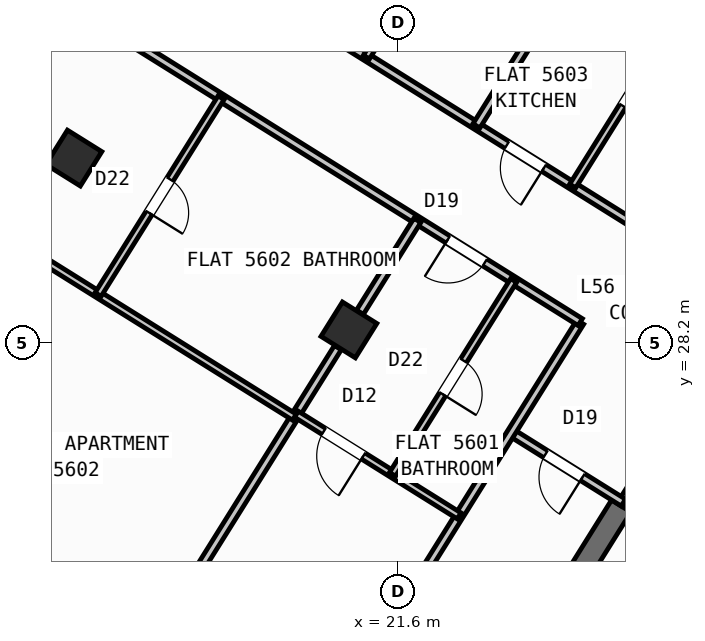
"""IFC4 building model, lengths in metres.
Left out: names, types, materials, properties, quantities, classifications, styles, units other than length and angle.
Written with IfcOpenShell. Run it as: python <this file> out.ifc"""

import sys

from ifc_helpers import new_model, si_unit, direction, frame, frame_2d, origin, origin_2d, place, context, subcontext, project, spatial, rectangle, hollow_rectangle, extrude, source, transform, mapped, element, fill, save


model = new_model("IFC4")
c1 = context("Model", 3, precision=1e-05, world=origin(), true_north=direction((0.0, 1.0)))
c2 = subcontext(c1, "Body", "Model", "MODEL_VIEW")
j1 = project(units=[si_unit("LENGTHUNIT", "METRE"), si_unit("PLANEANGLEUNIT", "RADIAN")], contexts=[c1])
p1 = place(None, origin())
s1 = spatial("IfcSite", under=j1, at=p1, CompositionType="ELEMENT")
p2 = place(p1, origin())
s2 = spatial("IfcBuilding", under=s1, at=p2, CompositionType="ELEMENT")
p3 = place(p2, frame((0.0, 0.0, 222.0)))
s3 = spatial("IfcBuildingStorey", under=s2, at=p3, CompositionType="ELEMENT", Elevation=222.0)
p4 = place(p3, frame((26.007, 24.976, 0.0), z_axis=(0.0, 0.0, 1.0), x_axis=(-0.529931155655, -0.848040665456, 0.0)))
e1 = element("IfcWall", 1, at=p4, inside=s3, PredefinedType="SHEAR", context=c2, shape_type="SweptSolid", body=[
    extrude(rectangle(XDim=6.475, YDim=0.45, at=frame_2d((3.238, 0.0))), origin(), (0.0, 0.0, 1.0), 3.35),
])
m1 = source(origin(), c2, "Body", "SweptSolid", [
    extrude(hollow_rectangle(XDim=0.8, YDim=0.8, WallThickness=0.032, at=origin_2d()), origin(), (0.0, 0.0, 1.0), 3.6),
])
for number, where, z_axis, x_axis in (
    (2, (20.632, 28.452, 0.0), (0.0, 0.0, 1.0), (-0.848, 0.53, 0.0)),
    (3, (15.205, 31.844, 0.0), (0.0, 0.0, 1.0), (-0.848, 0.53, 0.0)),
):
    element("IfcColumn", number, at=place(p3, frame(where, z_axis=z_axis, x_axis=x_axis)), inside=s3, PredefinedType="COLUMN", context=c2, shape_type="MappedRepresentation", body=[
        mapped(m1, transform((0.0, 0.0, 0.0), scale=1.0)),
    ])
p5 = place(p3, frame((31.76, 12.183, 0.0), z_axis=(0.0, 0.0, 1.0), x_axis=(-0.848047074256, 0.529920899612, 0.0)))
e4 = element("IfcWall", 4, at=p5, inside=s3, PredefinedType="STANDARD", context=c2, shape_type="SweptSolid", body=[
    extrude(rectangle(XDim=30.652, YDim=0.32, at=frame_2d((15.326, 0.0))), origin(), (0.0, 0.0, 1.0), 3.35),
])
p6 = place(p5, frame((15.166, 0.0, 0.0)))
e5 = element("IfcOpeningElement", 5, at=p6, cuts=e4, PredefinedType="OPENING", context=c2, shape_type="SweptSolid", body=[
    extrude(rectangle(XDim=1.2, YDim=2.15, at=frame_2d((0.6, 1.075))), frame((0.0, 0.17, 0.0), z_axis=(0.0, -1.0, 0.0), x_axis=(1.0, 0.0, 0.0)), (0.0, 0.0, 1.0), 0.34),
])
p7 = place(p5, frame((2.24, 0.0, 0.9)))
e6 = element("IfcOpeningElement", 6, at=p7, cuts=e4, PredefinedType="OPENING", context=c2, shape_type="SweptSolid", body=[
    extrude(rectangle(XDim=1.65, YDim=1.45, at=frame_2d((0.825, 0.725))), frame((0.0, 0.17, 0.0), z_axis=(0.0, -1.0, 0.0), x_axis=(1.0, 0.0, 0.0)), (0.0, 0.0, 1.0), 0.34),
])
p8 = place(p5, frame((7.469, 0.0, 0.9)))
e7 = element("IfcOpeningElement", 7, at=p8, cuts=e4, PredefinedType="OPENING", context=c2, shape_type="SweptSolid", body=[
    extrude(rectangle(XDim=1.65, YDim=1.45, at=frame_2d((0.825, 0.725))), frame((0.0, 0.17, 0.0), z_axis=(0.0, -1.0, 0.0), x_axis=(1.0, 0.0, 0.0)), (0.0, 0.0, 1.0), 0.34),
])
p9 = place(p5, frame((12.623, 0.0, 1.0)))
e8 = element("IfcOpeningElement", 8, at=p9, cuts=e4, PredefinedType="OPENING", context=c2, shape_type="SweptSolid", body=[
    extrude(rectangle(XDim=0.9, YDim=1.25, at=frame_2d((0.45, 0.625))), frame((0.0, 0.17, 0.0), z_axis=(0.0, -1.0, 0.0), x_axis=(1.0, 0.0, 0.0)), (0.0, 0.0, 1.0), 0.34),
])
p10 = place(p5, frame((19.583, 0.0, 1.0)))
e9 = element("IfcOpeningElement", 9, at=p10, cuts=e4, PredefinedType="OPENING", context=c2, shape_type="SweptSolid", body=[
    extrude(rectangle(XDim=0.9, YDim=1.25, at=frame_2d((0.45, 0.625))), frame((0.0, 0.17, 0.0), z_axis=(0.0, -1.0, 0.0), x_axis=(1.0, 0.0, 0.0)), (0.0, 0.0, 1.0), 0.34),
])
p11 = place(p5, frame((22.033, 0.0, 1.0)))
e10 = element("IfcOpeningElement", 10, at=p11, cuts=e4, PredefinedType="OPENING", context=c2, shape_type="SweptSolid", body=[
    extrude(rectangle(XDim=0.9, YDim=1.25, at=frame_2d((0.45, 0.625))), frame((0.0, 0.17, 0.0), z_axis=(0.0, -1.0, 0.0), x_axis=(1.0, 0.0, 0.0)), (0.0, 0.0, 1.0), 0.34),
])
p12 = place(p5, frame((27.666, 0.0, 0.9)))
e11 = element("IfcOpeningElement", 11, at=p12, cuts=e4, PredefinedType="OPENING", context=c2, shape_type="SweptSolid", body=[
    extrude(rectangle(XDim=1.35, YDim=1.45, at=frame_2d((0.675, 0.725))), frame((0.0, 0.17, 0.0), z_axis=(0.0, -1.0, 0.0), x_axis=(1.0, 0.0, 0.0)), (0.0, 0.0, 1.0), 0.34),
])
p13 = place(p3, frame((5.7, 28.71, 0.0), z_axis=(0.0, 0.0, 1.0), x_axis=(0.529923711467, 0.8480453172, 0.0)))
e12 = element("IfcWall", 12, at=p13, inside=s3, PredefinedType="STANDARD", context=c2, shape_type="SweptSolid", body=[
    extrude(rectangle(XDim=21.587, YDim=0.32, at=frame_2d((10.794, 0.0))), origin(), (0.0, 0.0, 1.0), 2.825),
])
p14 = place(p13, frame((2.319, 0.0, 0.9)))
e13 = element("IfcOpeningElement", 13, at=p14, cuts=e12, PredefinedType="OPENING", context=c2, shape_type="SweptSolid", body=[
    extrude(rectangle(XDim=1.65, YDim=1.45, at=frame_2d((0.825, 0.725))), frame((0.0, 0.17, 0.0), z_axis=(0.0, -1.0, 0.0), x_axis=(1.0, 0.0, 0.0)), (0.0, 0.0, 1.0), 0.34),
])
p15 = place(p13, frame((8.629, 0.0, 1.0)))
e14 = element("IfcOpeningElement", 14, at=p15, cuts=e12, PredefinedType="OPENING", context=c2, shape_type="SweptSolid", body=[
    extrude(rectangle(XDim=0.9, YDim=1.25, at=frame_2d((0.45, 0.625))), frame((0.0, 0.17, 0.0), z_axis=(0.0, -1.0, 0.0), x_axis=(1.0, 0.0, 0.0)), (0.0, 0.0, 1.0), 0.34),
])
p16 = place(p13, frame((13.159, 0.0, 1.0)))
e15 = element("IfcOpeningElement", 15, at=p16, cuts=e12, PredefinedType="OPENING", context=c2, shape_type="SweptSolid", body=[
    extrude(rectangle(XDim=0.9, YDim=1.25, at=frame_2d((0.45, 0.625))), frame((0.0, 0.17, 0.0), z_axis=(0.0, -1.0, 0.0), x_axis=(1.0, 0.0, 0.0)), (0.0, 0.0, 1.0), 0.34),
])
p17 = place(p13, frame((16.232, 0.0, 1.0)))
e16 = element("IfcOpeningElement", 16, at=p17, cuts=e12, PredefinedType="OPENING", context=c2, shape_type="SweptSolid", body=[
    extrude(rectangle(XDim=0.9, YDim=1.25, at=frame_2d((0.45, 0.625))), frame((0.0, 0.17, 0.0), z_axis=(0.0, -1.0, 0.0), x_axis=(1.0, 0.0, 0.0)), (0.0, 0.0, 1.0), 0.34),
])
p18 = place(p13, frame((18.925, 0.0, 0.9)))
e17 = element("IfcOpeningElement", 17, at=p18, cuts=e12, PredefinedType="OPENING", context=c2, shape_type="SweptSolid", body=[
    extrude(rectangle(XDim=1.35, YDim=1.45, at=frame_2d((0.675, 0.725))), frame((0.0, 0.17, 0.0), z_axis=(0.0, -1.0, 0.0), x_axis=(1.0, 0.0, 0.0)), (0.0, 0.0, 1.0), 0.34),
])
p19 = place(p3, frame((17.424, 47.083, 0.0), z_axis=(0.0, 0.0, 1.0), x_axis=(0.848049927979, -0.529916332693, 0.0)))
e18 = element("IfcWall", 18, at=p19, inside=s3, PredefinedType="STANDARD", context=c2, shape_type="SweptSolid", body=[
    extrude(rectangle(XDim=29.223, YDim=0.32, at=frame_2d((14.612, 0.0))), origin(), (0.0, 0.0, 1.0), 3.35),
])
p20 = place(p19, frame((3.77, 0.0, 0.0)))
e19 = element("IfcOpeningElement", 19, at=p20, cuts=e18, PredefinedType="OPENING", context=c2, shape_type="SweptSolid", body=[
    extrude(rectangle(XDim=1.05, YDim=2.15, at=frame_2d((0.525, 1.075))), frame((0.0, 0.17, 0.0), z_axis=(0.0, -1.0, 0.0), x_axis=(1.0, 0.0, 0.0)), (0.0, 0.0, 1.0), 0.34),
])
p21 = place(p19, frame((1.125, 0.0, 0.9)))
e20 = element("IfcOpeningElement", 20, at=p21, cuts=e18, PredefinedType="OPENING", context=c2, shape_type="SweptSolid", body=[
    extrude(rectangle(XDim=1.65, YDim=1.45, at=frame_2d((0.825, 0.725))), frame((0.0, 0.17, 0.0), z_axis=(0.0, -1.0, 0.0), x_axis=(1.0, 0.0, 0.0)), (0.0, 0.0, 1.0), 0.34),
])
p22 = place(p19, frame((7.384, 0.0, 0.9)))
e21 = element("IfcOpeningElement", 21, at=p22, cuts=e18, PredefinedType="OPENING", context=c2, shape_type="SweptSolid", body=[
    extrude(rectangle(XDim=1.35, YDim=1.45, at=frame_2d((0.675, 0.725))), frame((0.0, 0.17, 0.0), z_axis=(0.0, -1.0, 0.0), x_axis=(1.0, 0.0, 0.0)), (0.0, 0.0, 1.0), 0.34),
])
p23 = place(p19, frame((10.054, 0.0, 0.9)))
e22 = element("IfcOpeningElement", 22, at=p23, cuts=e18, PredefinedType="OPENING", context=c2, shape_type="SweptSolid", body=[
    extrude(rectangle(XDim=1.35, YDim=1.45, at=frame_2d((0.675, 0.725))), frame((0.0, 0.17, 0.0), z_axis=(0.0, -1.0, 0.0), x_axis=(1.0, 0.0, 0.0)), (0.0, 0.0, 1.0), 0.34),
])
p24 = place(p19, frame((14.039, 0.0, 1.0)))
e23 = element("IfcOpeningElement", 23, at=p24, cuts=e18, PredefinedType="OPENING", context=c2, shape_type="SweptSolid", body=[
    extrude(rectangle(XDim=0.9, YDim=1.25, at=frame_2d((0.45, 0.625))), frame((0.0, 0.17, 0.0), z_axis=(0.0, -1.0, 0.0), x_axis=(1.0, 0.0, 0.0)), (0.0, 0.0, 1.0), 0.34),
])
p25 = place(p19, frame((17.254, 0.0, 1.0)))
e24 = element("IfcOpeningElement", 24, at=p25, cuts=e18, PredefinedType="OPENING", context=c2, shape_type="SweptSolid", body=[
    extrude(rectangle(XDim=0.9, YDim=1.25, at=frame_2d((0.45, 0.625))), frame((0.0, 0.17, 0.0), z_axis=(0.0, -1.0, 0.0), x_axis=(1.0, 0.0, 0.0)), (0.0, 0.0, 1.0), 0.34),
])
p26 = place(p19, frame((20.161, 0.0, 0.9)))
e25 = element("IfcOpeningElement", 25, at=p26, cuts=e18, PredefinedType="OPENING", context=c2, shape_type="SweptSolid", body=[
    extrude(rectangle(XDim=1.35, YDim=1.45, at=frame_2d((0.675, 0.725))), frame((0.0, 0.17, 0.0), z_axis=(0.0, -1.0, 0.0), x_axis=(1.0, 0.0, 0.0)), (0.0, 0.0, 1.0), 0.34),
])
p27 = place(p19, frame((22.846, 0.0, 0.9)))
e26 = element("IfcOpeningElement", 26, at=p27, cuts=e18, PredefinedType="OPENING", context=c2, shape_type="SweptSolid", body=[
    extrude(rectangle(XDim=1.35, YDim=1.45, at=frame_2d((0.675, 0.725))), frame((0.0, 0.17, 0.0), z_axis=(0.0, -1.0, 0.0), x_axis=(1.0, 0.0, 0.0)), (0.0, 0.0, 1.0), 0.34),
])
p28 = place(p19, frame((26.898, 0.0, 1.0)))
e27 = element("IfcOpeningElement", 27, at=p28, cuts=e18, PredefinedType="OPENING", context=c2, shape_type="SweptSolid", body=[
    extrude(rectangle(XDim=0.9, YDim=1.25, at=frame_2d((0.45, 0.625))), frame((0.0, 0.17, 0.0), z_axis=(0.0, -1.0, 0.0), x_axis=(1.0, 0.0, 0.0)), (0.0, 0.0, 1.0), 0.34),
])
p29 = place(p3, frame((27.596, 27.52, 0.0), z_axis=(0.0, 0.0, 1.0), x_axis=(-0.529865479138, -0.848081702443, 0.0)))
e28 = element("IfcWall", 28, at=p29, inside=s3, PredefinedType="STANDARD", context=c2, shape_type="SweptSolid", body=[
    extrude(rectangle(XDim=2.96, YDim=0.2, at=frame_2d((1.48, 0.0))), origin(), (0.0, 0.0, 1.0), 3.34),
])
p30 = place(p29, frame((0.7, 0.0, 0.0)))
e29 = element("IfcOpeningElement", 29, at=p30, cuts=e28, PredefinedType="OPENING", context=c2, shape_type="SweptSolid", body=[
    extrude(rectangle(XDim=1.5, YDim=2.15, at=frame_2d((0.75, 1.075))), frame((0.0, 0.11, 0.0), z_axis=(0.0, -1.0, 0.0), x_axis=(1.0, 0.0, 0.0)), (0.0, 0.0, 1.0), 0.22),
])
p31 = place(p3, frame((26.049, 25.044, 0.0), z_axis=(0.0, 0.0, 1.0), x_axis=(-0.848050851465, 0.529914854792, 0.0)))
e30 = element("IfcWall", 30, at=p31, inside=s3, PredefinedType="PARTITIONING", context=c2, shape_type="SweptSolid", body=[
    extrude(rectangle(XDim=2.61, YDim=0.16, at=frame_2d((1.305, 0.0))), origin(), (0.0, 0.0, 1.0), 2.825),
])
p32 = place(p31, frame((0.95, 0.0, 0.0)))
e31 = element("IfcOpeningElement", 31, at=p32, cuts=e30, PredefinedType="OPENING", context=c2, shape_type="SweptSolid", body=[
    extrude(rectangle(XDim=0.86, YDim=2.05, at=frame_2d((0.43, 1.025))), frame((0.0, 0.09, 0.0), z_axis=(0.0, -1.0, 0.0), x_axis=(1.0, 0.0, 0.0)), (0.0, 0.0, 1.0), 0.18),
])
p33 = place(p3, frame((25.198, 28.606, 0.0), z_axis=(0.0, 0.0, 1.0), x_axis=(-0.529926497642, -0.848043576178, 0.0)))
e32 = element("IfcWall", 32, at=p33, inside=s3, PredefinedType="PARTITIONING", context=c2, shape_type="SweptSolid", body=[
    extrude(rectangle(XDim=10.3, YDim=0.16, at=frame_2d((5.15, 0.0))), origin(), (0.0, 0.0, 1.0), 3.34),
])
p34 = place(p3, frame((26.363, 30.472, 0.0), z_axis=(0.0, 0.0, 1.0), x_axis=(-0.848052408131, 0.529912363569, 0.0)))
e33 = element("IfcWall", 33, at=p34, inside=s3, PredefinedType="PARTITIONING", context=c2, shape_type="SweptSolid", body=[
    extrude(rectangle(XDim=16.73, YDim=0.16, at=frame_2d((8.365, 0.0))), origin(), (0.0, 0.0, 1.0), 3.34),
])
p35 = place(p34, frame((2.22, 0.0, 0.0)))
e34 = element("IfcOpeningElement", 34, at=p35, cuts=e33, PredefinedType="OPENING", context=c2, shape_type="SweptSolid", body=[
    extrude(rectangle(XDim=0.86, YDim=2.05, at=frame_2d((0.43, 1.025))), frame((0.0, 0.09, 0.0), z_axis=(0.0, -1.0, 0.0), x_axis=(1.0, 0.0, 0.0)), (0.0, 0.0, 1.0), 0.18),
])
p36 = place(p34, frame((7.82, 0.0, 0.0)))
e35 = element("IfcOpeningElement", 35, at=p36, cuts=e33, PredefinedType="OPENING", context=c2, shape_type="SweptSolid", body=[
    extrude(rectangle(XDim=1.0, YDim=2.1, at=frame_2d((0.5, 1.05))), frame((0.0, 0.09, 0.0), z_axis=(0.0, -1.0, 0.0), x_axis=(1.0, 0.0, 0.0)), (0.0, 0.0, 1.0), 0.18),
])
p37 = place(p34, frame((12.95, 0.0, 0.0)))
e36 = element("IfcOpeningElement", 36, at=p37, cuts=e33, PredefinedType="OPENING", context=c2, shape_type="SweptSolid", body=[
    extrude(rectangle(XDim=1.0, YDim=2.1, at=frame_2d((0.5, 1.05))), frame((0.0, 0.09, 0.0), z_axis=(0.0, -1.0, 0.0), x_axis=(1.0, 0.0, 0.0)), (0.0, 0.0, 1.0), 0.18),
])
p38 = place(p3, frame((25.198, 28.606, 0.0), z_axis=(0.0, 0.0, 1.0), x_axis=(-0.848052408131, 0.529912363569, 0.0)))
e37 = element("IfcWall", 37, at=p38, inside=s3, PredefinedType="PARTITIONING", context=c2, shape_type="SweptSolid", body=[
    extrude(rectangle(XDim=16.73, YDim=0.16, at=frame_2d((8.365, 0.0))), origin(), (0.0, 0.0, 1.0), 3.34),
])
p39 = place(p38, frame((2.22, 0.0, 0.0)))
e38 = element("IfcOpeningElement", 38, at=p39, cuts=e37, PredefinedType="OPENING", context=c2, shape_type="SweptSolid", body=[
    extrude(rectangle(XDim=0.86, YDim=2.05, at=frame_2d((0.43, 1.025))), frame((0.0, 0.09, 0.0), z_axis=(0.0, -1.0, 0.0), x_axis=(1.0, 0.0, 0.0)), (0.0, 0.0, 1.0), 0.18),
])
p40 = place(p38, frame((12.084, 0.0, 0.0)))
e39 = element("IfcOpeningElement", 39, at=p40, cuts=e37, PredefinedType="OPENING", context=c2, shape_type="SweptSolid", body=[
    extrude(rectangle(XDim=1.0, YDim=2.1, at=frame_2d((0.5, 1.05))), frame((0.0, 0.09, 0.0), z_axis=(0.0, -1.0, 0.0), x_axis=(1.0, 0.0, 0.0)), (0.0, 0.0, 1.0), 0.18),
])
p41 = place(p3, frame((21.983, 30.615, 0.0), z_axis=(0.0, 0.0, 1.0), x_axis=(-0.529978410432, -0.848011134641, 0.0)))
e40 = element("IfcWall", 40, at=p41, inside=s3, PredefinedType="PARTITIONING", context=c2, shape_type="SweptSolid", body=[
    extrude(rectangle(XDim=2.138, YDim=0.16, at=frame_2d((1.069, 0.0))), origin(), (0.0, 0.0, 1.0), 2.825),
])
p42 = place(p3, frame((20.414, 28.103, 0.0), z_axis=(0.0, 0.0, 1.0), x_axis=(-0.529934553702, -0.848038542045, 0.0)))
e41 = element("IfcWall", 41, at=p42, inside=s3, PredefinedType="PARTITIONING", context=c2, shape_type="SweptSolid", body=[
    extrude(rectangle(XDim=6.476, YDim=0.16, at=frame_2d((3.238, 0.0))), origin(), (0.0, 0.0, 1.0), 2.825),
])
p43 = place(p3, frame((22.807, 24.781, 0.0), z_axis=(0.0, 0.0, 1.0), x_axis=(-0.84803087207, 0.529946827537, 0.0)))
e42 = element("IfcWall", 42, at=p43, inside=s3, PredefinedType="PLUMBINGWALL", context=c2, shape_type="SweptSolid", body=[
    extrude(rectangle(XDim=3.79, YDim=0.14, at=frame_2d((1.895, 0.0))), origin(), (0.0, 0.0, 1.0), 3.34),
])
p44 = place(p43, frame((2.23, 0.0, 0.0)))
e43 = element("IfcOpeningElement", 43, at=p44, cuts=e42, PredefinedType="OPENING", context=c2, shape_type="SweptSolid", body=[
    extrude(rectangle(XDim=0.92, YDim=2.08, at=frame_2d((0.46, 1.04))), frame((0.0, 0.08, 0.0), z_axis=(0.0, -1.0, 0.0), x_axis=(1.0, 0.0, 0.0)), (0.0, 0.0, 1.0), 0.16),
])
p45 = place(p3, frame((23.883, 29.427, 0.0), z_axis=(0.0, 0.0, 1.0), x_axis=(-0.529950281337, -0.84802871373, 0.0)))
e44 = element("IfcWall", 44, at=p45, inside=s3, PredefinedType="PLUMBINGWALL", context=c2, shape_type="SweptSolid", body=[
    extrude(rectangle(XDim=4.51, YDim=0.14, at=frame_2d((2.255, 0.0))), origin(), (0.0, 0.0, 1.0), 2.995),
])
p46 = place(p45, frame((1.865, 0.0, 0.0)))
e45 = element("IfcOpeningElement", 45, at=p46, cuts=e44, PredefinedType="OPENING", context=c2, shape_type="SweptSolid", body=[
    extrude(rectangle(XDim=0.78, YDim=2.05, at=frame_2d((0.39, 1.025))), frame((0.0, 0.08, 0.0), z_axis=(0.0, -1.0, 0.0), x_axis=(1.0, 0.0, 0.0)), (0.0, 0.0, 1.0), 0.16),
])
p47 = place(p3, frame((19.556, 26.73, 0.0), z_axis=(0.0, 0.0, 1.0), x_axis=(-0.848043949058, 0.52992590092, 0.0)))
e46 = element("IfcWall", 46, at=p47, inside=s3, PredefinedType="PLUMBINGWALL", context=c2, shape_type="SweptSolid", body=[
    extrude(rectangle(XDim=12.92, YDim=0.14, at=frame_2d((6.46, 0.0))), origin(), (0.0, 0.0, 1.0), 3.34),
])
p48 = place(p47, frame((5.849, 0.0, 0.0)))
e47 = element("IfcOpeningElement", 47, at=p48, cuts=e46, PredefinedType="OPENING", context=c2, shape_type="SweptSolid", body=[
    extrude(rectangle(XDim=0.92, YDim=2.08, at=frame_2d((0.46, 1.04))), frame((0.0, 0.08, 0.0), z_axis=(0.0, -1.0, 0.0), x_axis=(1.0, 0.0, 0.0)), (0.0, 0.0, 1.0), 0.16),
])
p49 = place(p3, frame((18.109, 33.035, 0.0), z_axis=(0.0, 0.0, 1.0), x_axis=(-0.529893526057, -0.848064178611, 0.0)))
e48 = element("IfcWall", 48, at=p49, inside=s3, PredefinedType="PLUMBINGWALL", context=c2, shape_type="SweptSolid", body=[
    extrude(rectangle(XDim=4.58, YDim=0.14, at=frame_2d((2.29, 0.0))), origin(), (0.0, 0.0, 1.0), 3.34),
])
p50 = place(p49, frame((1.9, 0.0, 0.0)))
e49 = element("IfcOpeningElement", 49, at=p50, cuts=e48, PredefinedType="OPENING", context=c2, shape_type="SweptSolid", body=[
    extrude(rectangle(XDim=0.78, YDim=2.05, at=frame_2d((0.39, 1.025))), frame((0.0, 0.08, 0.0), z_axis=(0.0, -1.0, 0.0), x_axis=(1.0, 0.0, 0.0)), (0.0, 0.0, 1.0), 0.16),
])
p51 = place(p3, frame((24.282, 34.293, 0.0), z_axis=(0.0, 0.0, 1.0), x_axis=(-0.529927092104, -0.84804320471, 0.0)))
e50 = element("IfcWall", 50, at=p51, inside=s3, PredefinedType="PARTITIONING", context=c2, shape_type="SweptSolid", body=[
    extrude(rectangle(XDim=2.138, YDim=0.16, at=frame_2d((1.069, 0.0))), origin(), (0.0, 0.0, 1.0), 2.825),
])
p52 = place(p3, frame((27.439, 35.118, 0.0), z_axis=(0.0, 0.0, 1.0), x_axis=(-0.529911350634, -0.84805304107, 0.0)))
e51 = element("IfcWall", 51, at=p52, inside=s3, PredefinedType="PLUMBINGWALL", context=c2, shape_type="SweptSolid", body=[
    extrude(rectangle(XDim=4.51, YDim=0.14, at=frame_2d((2.255, 0.0))), origin(), (0.0, 0.0, 1.0), 2.995),
])
p53 = place(p52, frame((1.865, 0.0, 0.0)))
e52 = element("IfcOpeningElement", 52, at=p53, cuts=e51, PredefinedType="OPENING", context=c2, shape_type="SweptSolid", body=[
    extrude(rectangle(XDim=0.78, YDim=2.05, at=frame_2d((0.39, 1.025))), frame((0.0, 0.08, 0.0), z_axis=(0.0, -1.0, 0.0), x_axis=(1.0, 0.0, 0.0)), (0.0, 0.0, 1.0), 0.16),
])
p54 = place(p3, frame((23.405, 37.721, 0.0), z_axis=(0.0, 0.0, 1.0), x_axis=(-0.529955816375, -0.848025254748, 0.0)))
e53 = element("IfcWall", 53, at=p54, inside=s3, PredefinedType="PLUMBINGWALL", context=c2, shape_type="SweptSolid", body=[
    extrude(rectangle(XDim=4.58, YDim=0.14, at=frame_2d((2.29, 0.0))), origin(), (0.0, 0.0, 1.0), 3.34),
])
p55 = place(p54, frame((1.9, 0.0, 0.0)))
e54 = element("IfcOpeningElement", 54, at=p55, cuts=e53, PredefinedType="OPENING", context=c2, shape_type="SweptSolid", body=[
    extrude(rectangle(XDim=0.78, YDim=2.05, at=frame_2d((0.39, 1.025))), frame((0.0, 0.08, 0.0), z_axis=(0.0, -1.0, 0.0), x_axis=(1.0, 0.0, 0.0)), (0.0, 0.0, 1.0), 0.16),
])
m2 = source(origin(), c2, "Body", "SweptSolid", [
    extrude(rectangle(XDim=0.86, YDim=2.05, at=frame_2d((0.43, 1.025))), frame((0.0, 0.025, 0.0), z_axis=(0.0, -1.0, 0.0), x_axis=(1.0, 0.0, 0.0)), (0.0, 0.0, 1.0), 0.05),
])
p56 = place(p32, origin())
e55 = element("IfcDoor", 55, at=p56, inside=s3, OperationType="SINGLE_SWING_LEFT", PredefinedType="DOOR", context=c2, shape_type="MappedRepresentation", body=[
    mapped(m2, transform((0.0, 0.0, 0.0), scale=1.0)),
])
fill(e31, e55)
p57 = place(p39, origin())
e56 = element("IfcDoor", 56, at=p57, inside=s3, OperationType="SINGLE_SWING_RIGHT", PredefinedType="DOOR", context=c2, shape_type="MappedRepresentation", body=[
    mapped(m2, transform((0.0, 0.0, 0.0), scale=1.0)),
])
fill(e38, e56)
m3 = source(origin(), c2, "Body", "SweptSolid", [
    extrude(rectangle(XDim=0.92, YDim=2.08, at=frame_2d((0.46, 1.04))), frame((0.0, 0.025, 0.0), z_axis=(0.0, -1.0, 0.0), x_axis=(1.0, 0.0, 0.0)), (0.0, 0.0, 1.0), 0.05),
])
p58 = place(p44, origin())
e57 = element("IfcDoor", 57, at=p58, inside=s3, OperationType="SINGLE_SWING_LEFT", PredefinedType="DOOR", context=c2, shape_type="MappedRepresentation", body=[
    mapped(m3, transform((0.0, 0.0, 0.0), scale=1.0)),
])
fill(e43, e57)
m4 = source(origin(), c2, "Body", "SweptSolid", [
    extrude(rectangle(XDim=0.78, YDim=2.05, at=frame_2d((0.39, 1.025))), frame((0.0, 0.025, 0.0), z_axis=(0.0, -1.0, 0.0), x_axis=(1.0, 0.0, 0.0)), (0.0, 0.0, 1.0), 0.05),
])
p59 = place(p46, origin())
e58 = element("IfcDoor", 58, at=p59, inside=s3, OperationType="SINGLE_SWING_RIGHT", PredefinedType="DOOR", context=c2, shape_type="MappedRepresentation", body=[
    mapped(m4, transform((0.0, 0.0, 0.0), scale=1.0)),
])
fill(e45, e58)
p60 = place(p50, origin())
e59 = element("IfcDoor", 59, at=p60, inside=s3, OperationType="SINGLE_SWING_RIGHT", PredefinedType="DOOR", context=c2, shape_type="MappedRepresentation", body=[
    mapped(m4, transform((0.0, 0.0, 0.0), scale=1.0)),
])
fill(e49, e59)
p61 = place(p35, origin())
e60 = element("IfcDoor", 60, at=p61, inside=s3, OperationType="SINGLE_SWING_LEFT", PredefinedType="DOOR", context=c2, shape_type="MappedRepresentation", body=[
    mapped(m2, transform((0.0, 0.0, 0.0), scale=1.0)),
])
fill(e34, e60)
p62 = place(p53, origin())
e61 = element("IfcDoor", 61, at=p62, inside=s3, OperationType="SINGLE_SWING_LEFT", PredefinedType="DOOR", context=c2, shape_type="MappedRepresentation", body=[
    mapped(m4, transform((0.0, 0.0, 0.0), scale=1.0)),
])
fill(e52, e61)
save(model, sys.argv[1])
